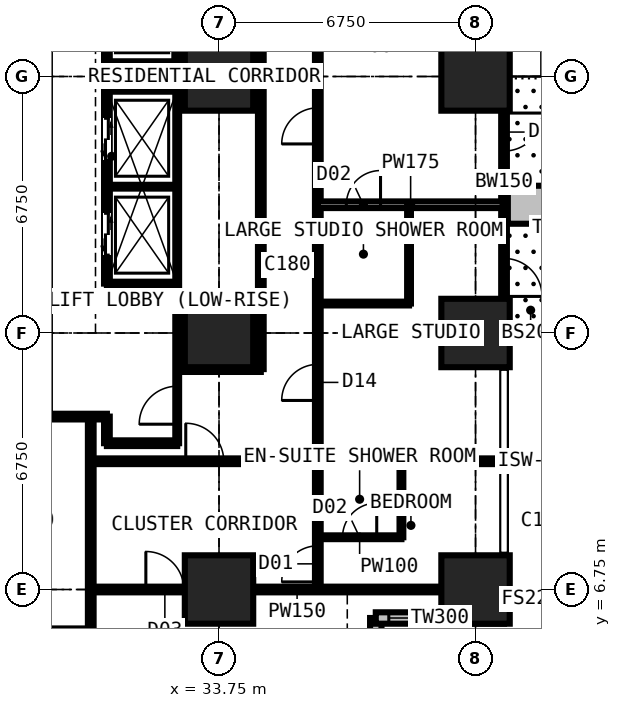
"""IFC4 building model, lengths in metres.
Left out: names, types, materials, properties, quantities, classifications, styles, units other than length and angle.
Written with IfcOpenShell. Run it as: python <this file> out.ifc"""

import sys

from ifc_helpers import new_model, si_unit, direction, frame, frame_2d, origin, origin_2d, place, context, subcontext, project, spatial, rectangle, extrude, element, fill, save


model = new_model("IFC4")
c1 = context("Model", 3, precision=1e-05, world=origin(), true_north=direction((0.0, 1.0)))
c2 = subcontext(c1, "Body", "Model", "MODEL_VIEW")
j1 = project(units=[si_unit("LENGTHUNIT", "METRE"), si_unit("PLANEANGLEUNIT", "RADIAN")], contexts=[c1])
p1 = place(None, origin())
s1 = spatial("IfcSite", under=j1, at=p1, CompositionType="ELEMENT")
p2 = place(p1, origin())
s2 = spatial("IfcBuilding", under=s1, at=p2, CompositionType="ELEMENT")
p3 = place(p2, frame((0.0, 0.0, 68.4)))
s3 = spatial("IfcBuildingStorey", under=s2, at=p3, CompositionType="ELEMENT", Elevation=68.4)
for number, where, z_axis, x_axis in (
    (1, (33.75, 6.75, 0.0), (0.0, 0.0, 1.0), (1.0, 0.0, 0.0)),
    (2, (33.75, 13.5, 0.0), (0.0, 0.0, 1.0), (1.0, 0.0, 0.0)),
    (3, (33.75, 20.25, 0.0), (0.0, 0.0, 1.0), (1.0, 0.0, 0.0)),
    (4, (40.5, 6.75, 0.0), (0.0, 0.0, 1.0), (1.0, 0.0, 0.0)),
    (5, (40.5, 13.5, 0.0), (0.0, 0.0, 1.0), (1.0, 0.0, 0.0)),
    (6, (40.5, 20.25, 0.0), (0.0, 0.0, 1.0), (1.0, 0.0, 0.0)),
):
    element("IfcColumn", number, at=place(p3, frame(where, z_axis=z_axis, x_axis=x_axis)), inside=s3, PredefinedType="COLUMN", context=c2, shape_type="SweptSolid", body=[
        extrude(rectangle(XDim=1.8, YDim=1.8, at=origin_2d()), origin(), (0.0, 0.0, 1.0), 3.6),
    ])
p4 = place(p3, frame((41.25, 20.25, 0.0), z_axis=(0.0, 0.0, 1.0), x_axis=(0.0, -1.0, 0.0)))
e7 = element("IfcWall", 7, at=p4, inside=s3, PredefinedType="SOLIDWALL", context=c2, shape_type="SweptSolid", body=[
    extrude(rectangle(XDim=6.75, YDim=0.15, at=frame_2d((3.375, 0.0))), origin(), (0.0, 0.0, 1.0), 3.375),
])
p5 = place(p4, frame((0.962, 0.0, 0.0)))
e8 = element("IfcOpeningElement", 8, at=p5, cuts=e7, PredefinedType="OPENING", context=c2, shape_type="SweptSolid", body=[
    extrude(rectangle(XDim=1.0, YDim=2.2, at=frame_2d((0.5, 1.1))), frame((0.0, 0.085, 0.0), z_axis=(0.0, -1.0, 0.0), x_axis=(1.0, 0.0, 0.0)), (0.0, 0.0, 1.0), 0.17),
])
p6 = place(p4, frame((2.025, 0.0, 0.9)))
e9 = element("IfcOpeningElement", 9, at=p6, cuts=e7, PredefinedType="OPENING", context=c2, shape_type="SweptSolid", body=[
    extrude(rectangle(XDim=1.2, YDim=1.8, at=frame_2d((0.6, 0.9))), frame((0.0, 0.085, 0.0), z_axis=(0.0, -1.0, 0.0), x_axis=(1.0, 0.0, 0.0)), (0.0, 0.0, 1.0), 0.17),
])
p7 = place(p4, frame((4.788, 0.0, 0.0)))
e10 = element("IfcOpeningElement", 10, at=p7, cuts=e7, PredefinedType="OPENING", context=c2, shape_type="SweptSolid", body=[
    extrude(rectangle(XDim=1.0, YDim=2.2, at=frame_2d((0.5, 1.1))), frame((0.0, 0.085, 0.0), z_axis=(0.0, -1.0, 0.0), x_axis=(1.0, 0.0, 0.0)), (0.0, 0.0, 1.0), 0.17),
])
p8 = place(p4, frame((3.525, 0.0, 0.9)))
e11 = element("IfcOpeningElement", 11, at=p8, cuts=e7, PredefinedType="OPENING", context=c2, shape_type="SweptSolid", body=[
    extrude(rectangle(XDim=1.2, YDim=1.8, at=frame_2d((0.6, 0.9))), frame((0.0, 0.085, 0.0), z_axis=(0.0, -1.0, 0.0), x_axis=(1.0, 0.0, 0.0)), (0.0, 0.0, 1.0), 0.17),
])
p9 = place(p3, frame((37.875, 2.625, 0.0), z_axis=(0.0, 0.0, 1.0), x_axis=(0.0, 1.0, 0.0)))
e12 = element("IfcWall", 12, at=p9, inside=s3, PredefinedType="SOLIDWALL", context=c2, shape_type="SweptSolid", body=[
    extrude(rectangle(XDim=3.375, YDim=0.3, at=frame_2d((1.688, 0.0))), origin(), (0.0, 0.0, 1.0), 3.375),
])
p10 = place(p9, frame((0.788, 0.0, 0.6)))
e13 = element("IfcOpeningElement", 13, at=p10, cuts=e12, PredefinedType="OPENING", context=c2, shape_type="SweptSolid", body=[
    extrude(rectangle(XDim=1.8, YDim=2.1, at=frame_2d((0.9, 1.05))), frame((0.0, 0.16, 0.0), z_axis=(0.0, -1.0, 0.0), x_axis=(1.0, 0.0, 0.0)), (0.0, 0.0, 1.0), 0.32),
])
p11 = place(p3, frame((37.875, 6.0, 0.0), z_axis=(0.0, 0.0, 1.0), x_axis=(1.0, 0.0, 0.0)))
e14 = element("IfcWall", 14, at=p11, inside=s3, PredefinedType="SOLIDWALL", context=c2, shape_type="SweptSolid", body=[
    extrude(rectangle(XDim=3.375, YDim=0.3, at=frame_2d((1.688, 0.0))), origin(), (0.0, 0.0, 1.0), 3.375),
])
p12 = place(p11, frame((0.343, 0.0, 0.9)))
e15 = element("IfcOpeningElement", 15, at=p12, cuts=e14, PredefinedType="OPENING", context=c2, shape_type="SweptSolid", body=[
    extrude(rectangle(XDim=1.2, YDim=1.8, at=frame_2d((0.6, 0.9))), frame((0.0, 0.16, 0.0), z_axis=(0.0, -1.0, 0.0), x_axis=(1.0, 0.0, 0.0)), (0.0, 0.0, 1.0), 0.32),
])
p13 = place(p3, frame((41.35, 16.875, 0.0), z_axis=(0.0, 0.0, 1.0), x_axis=(1.0, 0.0, 0.0)))
e16 = element("IfcWall", 16, at=p13, inside=s3, PredefinedType="USERDEFINED", context=c2, shape_type="SweptSolid", body=[
    extrude(rectangle(XDim=2.2, YDim=1.0, at=frame_2d((1.1, 0.0))), origin(), (0.0, 0.0, 1.0), 0.9),
])
p14 = place(p3, frame((10.125, 11.3, 0.0), z_axis=(0.0, 0.0, 1.0), x_axis=(1.0, 0.0, 0.0)))
e17 = element("IfcWall", 17, at=p14, inside=s3, PredefinedType="PARTITIONING", context=c2, shape_type="SweptSolid", body=[
    extrude(rectangle(XDim=20.675, YDim=0.15, at=frame_2d((10.337, 0.0))), origin(), (0.0, 0.0, 1.0), 3.375),
])
p15 = place(p14, frame((8.375, 0.0, 0.0)))
e18 = element("IfcOpeningElement", 18, at=p15, cuts=e17, PredefinedType="OPENING", context=c2, shape_type="SweptSolid", body=[
    extrude(rectangle(XDim=1.0, YDim=2.2, at=frame_2d((0.5, 1.1))), frame((0.0, 0.085, 0.0), z_axis=(0.0, -1.0, 0.0), x_axis=(1.0, 0.0, 0.0)), (0.0, 0.0, 1.0), 0.17),
])
p16 = place(p14, frame((10.975, 0.0, 0.0)))
e19 = element("IfcOpeningElement", 19, at=p16, cuts=e17, PredefinedType="OPENING", context=c2, shape_type="SweptSolid", body=[
    extrude(rectangle(XDim=1.0, YDim=2.2, at=frame_2d((0.5, 1.1))), frame((0.0, 0.085, 0.0), z_axis=(0.0, -1.0, 0.0), x_axis=(1.0, 0.0, 0.0)), (0.0, 0.0, 1.0), 0.17),
])
p17 = place(p14, frame((3.925, 0.0, 0.0)))
e20 = element("IfcOpeningElement", 20, at=p17, cuts=e17, PredefinedType="OPENING", context=c2, shape_type="SweptSolid", body=[
    extrude(rectangle(XDim=0.95, YDim=2.2, at=frame_2d((0.475, 1.1))), frame((0.0, 0.085, 0.0), z_axis=(0.0, -1.0, 0.0), x_axis=(1.0, 0.0, 0.0)), (0.0, 0.0, 1.0), 0.17),
])
p18 = place(p3, frame((30.375, -0.734, 0.0), z_axis=(0.0, 0.0, 1.0), x_axis=(0.0, 1.0, 0.0)))
e21 = element("IfcWall", 21, at=p18, inside=s3, PredefinedType="PARTITIONING", context=c2, shape_type="SweptSolid", body=[
    extrude(rectangle(XDim=12.034, YDim=0.15, at=frame_2d((6.017, 0.0))), origin(), (0.0, 0.0, 1.0), 3.375),
])
p19 = place(p3, frame((30.375, 6.75, 0.0), z_axis=(0.0, 0.0, 1.0), x_axis=(1.0, 0.0, 0.0)))
e22 = element("IfcWall", 22, at=p19, inside=s3, PredefinedType="PARTITIONING", context=c2, shape_type="SweptSolid", body=[
    extrude(rectangle(XDim=10.859, YDim=0.15, at=frame_2d((5.429, 0.0))), origin(), (0.0, 0.0, 1.0), 2.877),
])
p20 = place(p19, frame((1.45, 0.0, 0.0)))
e23 = element("IfcOpeningElement", 23, at=p20, cuts=e22, PredefinedType="OPENING", context=c2, shape_type="SweptSolid", body=[
    extrude(rectangle(XDim=1.0, YDim=2.2, at=frame_2d((0.5, 1.1))), frame((0.0, 0.085, 0.0), z_axis=(0.0, -1.0, 0.0), x_axis=(1.0, 0.0, 0.0)), (0.0, 0.0, 1.0), 0.17),
])
p21 = place(p3, frame((30.375, 10.125, 0.0), z_axis=(0.0, 0.0, 1.0), x_axis=(1.0, 0.0, 0.0)))
e24 = element("IfcWall", 24, at=p21, inside=s3, PredefinedType="PARTITIONING", context=c2, shape_type="SweptSolid", body=[
    extrude(rectangle(XDim=10.859, YDim=0.15, at=frame_2d((5.429, 0.0))), origin(), (0.0, 0.0, 1.0), 3.375),
])
p22 = place(p21, frame((2.5, 0.0, 0.0)))
e25 = element("IfcOpeningElement", 25, at=p22, cuts=e24, PredefinedType="OPENING", context=c2, shape_type="SweptSolid", body=[
    extrude(rectangle(XDim=1.0, YDim=2.2, at=frame_2d((0.5, 1.1))), frame((0.0, 0.085, 0.0), z_axis=(0.0, -1.0, 0.0), x_axis=(1.0, 0.0, 0.0)), (0.0, 0.0, 1.0), 0.17),
])
p23 = place(p3, frame((30.8, 10.6, 0.0), z_axis=(0.0, 0.0, 1.0), x_axis=(0.0, 1.0, 0.0)))
e26 = element("IfcWall", 26, at=p23, inside=s3, PredefinedType="PARTITIONING", context=c2, shape_type="SweptSolid", body=[
    extrude(rectangle(XDim=0.7, YDim=0.15, at=frame_2d((0.35, 0.0))), origin(), (0.0, 0.0, 1.0), 3.375),
])
p24 = place(p3, frame((30.8, 10.6, 0.0), z_axis=(0.0, 0.0, 1.0), x_axis=(1.0, 0.0, 0.0)))
e27 = element("IfcWall", 27, at=p24, inside=s3, PredefinedType="PARTITIONING", context=c2, shape_type="SweptSolid", body=[
    extrude(rectangle(XDim=1.85, YDim=0.15, at=frame_2d((0.925, 0.0))), origin(), (0.0, 0.0, 1.0), 3.375),
])
p25 = place(p3, frame((30.8, 14.8, 0.0), z_axis=(0.0, 0.0, 1.0), x_axis=(0.0, 1.0, 0.0)))
e28 = element("IfcWall", 28, at=p25, inside=s3, PredefinedType="PARTITIONING", context=c2, shape_type="SweptSolid", body=[
    extrude(rectangle(XDim=10.9, YDim=0.15, at=frame_2d((5.45, 0.0))), origin(), (0.0, 0.0, 1.0), 3.375),
])
p26 = place(p25, frame((0.75, 0.0, 0.0)))
e29 = element("IfcOpeningElement", 29, at=p26, cuts=e28, PredefinedType="OPENING", context=c2, shape_type="SweptSolid", body=[
    extrude(rectangle(XDim=1.1, YDim=2.2, at=frame_2d((0.55, 1.1))), frame((0.0, 0.085, 0.0), z_axis=(0.0, -1.0, 0.0), x_axis=(1.0, 0.0, 0.0)), (0.0, 0.0, 1.0), 0.17),
])
p27 = place(p25, frame((3.25, 0.0, 0.0)))
e30 = element("IfcOpeningElement", 30, at=p27, cuts=e28, PredefinedType="OPENING", context=c2, shape_type="SweptSolid", body=[
    extrude(rectangle(XDim=1.1, YDim=2.2, at=frame_2d((0.55, 1.1))), frame((0.0, 0.085, 0.0), z_axis=(0.0, -1.0, 0.0), x_axis=(1.0, 0.0, 0.0)), (0.0, 0.0, 1.0), 0.17),
])
p28 = place(p25, frame((6.5, 0.0, 0.0)))
e31 = element("IfcOpeningElement", 31, at=p28, cuts=e28, PredefinedType="OPENING", context=c2, shape_type="SweptSolid", body=[
    extrude(rectangle(XDim=1.1, YDim=2.2, at=frame_2d((0.55, 1.1))), frame((0.0, 0.085, 0.0), z_axis=(0.0, -1.0, 0.0), x_axis=(1.0, 0.0, 0.0)), (0.0, 0.0, 1.0), 0.17),
])
p29 = place(p25, frame((9.05, 0.0, 0.0)))
e32 = element("IfcOpeningElement", 32, at=p29, cuts=e28, PredefinedType="OPENING", context=c2, shape_type="SweptSolid", body=[
    extrude(rectangle(XDim=1.1, YDim=2.2, at=frame_2d((0.55, 1.1))), frame((0.0, 0.085, 0.0), z_axis=(0.0, -1.0, 0.0), x_axis=(1.0, 0.0, 0.0)), (0.0, 0.0, 1.0), 0.17),
])
for number, where, z_axis, x_axis in (
    (33, (30.8, 14.8, 0.0), (0.0, 0.0, 1.0), (1.0, 0.0, 0.0)),
    (34, (30.8, 17.35, 0.0), (0.0, 0.0, 1.0), (1.0, 0.0, 0.0)),
    (35, (30.8, 19.9, 0.0), (0.0, 0.0, 1.0), (1.0, 0.0, 0.0)),
    (36, (30.8, 20.6, 0.0), (0.0, 0.0, 1.0), (1.0, 0.0, 0.0)),
):
    element("IfcWall", number, at=place(p3, frame(where, z_axis=z_axis, x_axis=x_axis)), inside=s3, PredefinedType="SHEAR", context=c2, shape_type="SweptSolid", body=[
        extrude(rectangle(XDim=1.85, YDim=0.1, at=frame_2d((0.925, 0.0))), origin(), (0.0, 0.0, 1.0), 3.375),
    ])
p30 = place(p3, frame((32.65, 10.6, 0.0), z_axis=(0.0, 0.0, 1.0), x_axis=(0.0, 1.0, 0.0)))
e37 = element("IfcWall", 37, at=p30, inside=s3, PredefinedType="SHEAR", context=c2, shape_type="SweptSolid", body=[
    extrude(rectangle(XDim=9.3, YDim=0.1, at=frame_2d((4.65, 0.0))), origin(), (0.0, 0.0, 1.0), 3.375),
])
p31 = place(p30, frame((0.5, 0.0, 0.0)))
e38 = element("IfcOpeningElement", 38, at=p31, cuts=e37, PredefinedType="OPENING", context=c2, shape_type="SweptSolid", body=[
    extrude(rectangle(XDim=1.0, YDim=2.2, at=frame_2d((0.5, 1.1))), frame((0.0, 0.06, 0.0), z_axis=(0.0, -1.0, 0.0), x_axis=(1.0, 0.0, 0.0)), (0.0, 0.0, 1.0), 0.12),
])
p32 = place(p3, frame((32.65, 12.55, 0.0), z_axis=(0.0, 0.0, 1.0), x_axis=(1.0, 0.0, 0.0)))
e39 = element("IfcWall", 39, at=p32, inside=s3, PredefinedType="PARTITIONING", context=c2, shape_type="SweptSolid", body=[
    extrude(rectangle(XDim=2.2, YDim=0.15, at=frame_2d((1.1, 0.0))), origin(), (0.0, 0.0, 1.0), 3.375),
])
p33 = place(p3, frame((32.65, 20.6, 0.0), z_axis=(0.0, 0.0, 1.0), x_axis=(0.0, 1.0, 0.0)))
e40 = element("IfcWall", 40, at=p33, inside=s3, PredefinedType="PARTITIONING", context=c2, shape_type="SweptSolid", body=[
    extrude(rectangle(XDim=5.1, YDim=0.15, at=frame_2d((2.55, 0.0))), origin(), (0.0, 0.0, 1.0), 3.375),
])
p34 = place(p3, frame((34.85, 12.55, 0.0), z_axis=(0.0, 0.0, 1.0), x_axis=(0.0, 1.0, 0.0)))
e41 = element("IfcWall", 41, at=p34, inside=s3, PredefinedType="PARTITIONING", context=c2, shape_type="SweptSolid", body=[
    extrude(rectangle(XDim=17.825, YDim=0.15, at=frame_2d((8.913, 0.0))), origin(), (0.0, 0.0, 1.0), 3.375),
])
p35 = place(p34, frame((8.6, 0.0, 0.0)))
e42 = element("IfcOpeningElement", 42, at=p35, cuts=e41, PredefinedType="OPENING", context=c2, shape_type="SweptSolid", body=[
    extrude(rectangle(XDim=0.95, YDim=2.2, at=frame_2d((0.475, 1.1))), frame((0.0, 0.085, 0.0), z_axis=(0.0, -1.0, 0.0), x_axis=(1.0, 0.0, 0.0)), (0.0, 0.0, 1.0), 0.17),
])
p36 = place(p3, frame((36.35, 6.75, 0.0), z_axis=(0.0, 0.0, 1.0), x_axis=(0.0, 1.0, 0.0)))
e43 = element("IfcWall", 43, at=p36, inside=s3, PredefinedType="PARTITIONING", context=c2, shape_type="SweptSolid", body=[
    extrude(rectangle(XDim=23.625, YDim=0.15, at=frame_2d((11.812, 0.0))), origin(), (0.0, 0.0, 1.0), 3.375),
])
p37 = place(p36, frame((0.2, 0.0, 0.0)))
e44 = element("IfcOpeningElement", 44, at=p37, cuts=e43, PredefinedType="OPENING", context=c2, shape_type="SweptSolid", body=[
    extrude(rectangle(XDim=0.95, YDim=2.2, at=frame_2d((0.475, 1.1))), frame((0.0, 0.085, 0.0), z_axis=(0.0, -1.0, 0.0), x_axis=(1.0, 0.0, 0.0)), (0.0, 0.0, 1.0), 0.17),
])
p38 = place(p36, frame((18.475, 0.0, 0.0)))
e45 = element("IfcOpeningElement", 45, at=p38, cuts=e43, PredefinedType="OPENING", context=c2, shape_type="SweptSolid", body=[
    extrude(rectangle(XDim=0.95, YDim=2.2, at=frame_2d((0.475, 1.1))), frame((0.0, 0.085, 0.0), z_axis=(0.0, -1.0, 0.0), x_axis=(1.0, 0.0, 0.0)), (0.0, 0.0, 1.0), 0.17),
])
p39 = place(p36, frame((11.725, 0.0, 0.0)))
e46 = element("IfcOpeningElement", 46, at=p39, cuts=e43, PredefinedType="OPENING", context=c2, shape_type="SweptSolid", body=[
    extrude(rectangle(XDim=0.95, YDim=2.2, at=frame_2d((0.475, 1.1))), frame((0.0, 0.085, 0.0), z_axis=(0.0, -1.0, 0.0), x_axis=(1.0, 0.0, 0.0)), (0.0, 0.0, 1.0), 0.17),
])
p40 = place(p36, frame((4.975, 0.0, 0.0)))
e47 = element("IfcOpeningElement", 47, at=p40, cuts=e43, PredefinedType="OPENING", context=c2, shape_type="SweptSolid", body=[
    extrude(rectangle(XDim=0.95, YDim=2.2, at=frame_2d((0.475, 1.1))), frame((0.0, 0.085, 0.0), z_axis=(0.0, -1.0, 0.0), x_axis=(1.0, 0.0, 0.0)), (0.0, 0.0, 1.0), 0.17),
])
p41 = place(p3, frame((36.35, 8.125, 0.0), z_axis=(0.0, 0.0, 1.0), x_axis=(1.0, 0.0, 0.0)))
e48 = element("IfcWall", 48, at=p41, inside=s3, PredefinedType="PARTITIONING", context=c2, shape_type="SweptSolid", body=[
    extrude(rectangle(XDim=2.2, YDim=0.1, at=frame_2d((1.1, 0.0))), origin(), (0.0, 0.0, 1.0), 3.375),
])
p42 = place(p41, frame((0.65, 0.0, 0.0)))
e49 = element("IfcOpeningElement", 49, at=p42, cuts=e48, PredefinedType="OPENING", context=c2, shape_type="SweptSolid", body=[
    extrude(rectangle(XDim=0.9, YDim=2.2, at=frame_2d((0.45, 1.1))), frame((0.0, 0.06, 0.0), z_axis=(0.0, -1.0, 0.0), x_axis=(1.0, 0.0, 0.0)), (0.0, 0.0, 1.0), 0.12),
])
p43 = place(p3, frame((36.35, 14.275, 0.0), z_axis=(0.0, 0.0, 1.0), x_axis=(1.0, 0.0, 0.0)))
e50 = element("IfcWall", 50, at=p43, inside=s3, PredefinedType="PARTITIONING", context=c2, shape_type="SweptSolid", body=[
    extrude(rectangle(XDim=2.4, YDim=0.1, at=frame_2d((1.2, 0.0))), origin(), (0.0, 0.0, 1.0), 3.375),
])
p44 = place(p3, frame((36.35, 16.875, 0.0), z_axis=(0.0, 0.0, 1.0), x_axis=(1.0, 0.0, 0.0)))
e51 = element("IfcWall", 51, at=p44, inside=s3, PredefinedType="PARTITIONING", context=c2, shape_type="SweptSolid", body=[
    extrude(rectangle(XDim=4.884, YDim=0.175, at=frame_2d((2.442, 0.0))), origin(), (0.0, 0.0, 1.0), 3.375),
])
p45 = place(p44, frame((0.75, 0.0, 0.0)))
e52 = element("IfcOpeningElement", 52, at=p45, cuts=e51, PredefinedType="OPENING", context=c2, shape_type="SweptSolid", body=[
    extrude(rectangle(XDim=0.9, YDim=2.2, at=frame_2d((0.45, 1.1))), frame((0.0, 0.097, 0.0), z_axis=(0.0, -1.0, 0.0), x_axis=(1.0, 0.0, 0.0)), (0.0, 0.0, 1.0), 0.195),
])
p46 = place(p3, frame((38.55, 8.125, 0.0), z_axis=(0.0, 0.0, 1.0), x_axis=(0.0, 1.0, 0.0)))
e53 = element("IfcWall", 53, at=p46, inside=s3, PredefinedType="PARTITIONING", context=c2, shape_type="SweptSolid", body=[
    extrude(rectangle(XDim=2.0, YDim=0.1, at=frame_2d((1.0, 0.0))), origin(), (0.0, 0.0, 1.0), 3.375),
])
p47 = place(p3, frame((38.75, 14.275, 0.0), z_axis=(0.0, 0.0, 1.0), x_axis=(0.0, 1.0, 0.0)))
e54 = element("IfcWall", 54, at=p47, inside=s3, PredefinedType="PARTITIONING", context=c2, shape_type="SweptSolid", body=[
    extrude(rectangle(XDim=2.6, YDim=0.1, at=frame_2d((1.3, 0.0))), origin(), (0.0, 0.0, 1.0), 3.375),
])
p48 = place(p5, origin())
e55 = element("IfcDoor", 55, at=p48, inside=s3, OperationType="SINGLE_SWING_LEFT", PredefinedType="DOOR", context=c2, shape_type="SweptSolid", body=[
    extrude(rectangle(XDim=1.0, YDim=2.2, at=frame_2d((0.5, 1.1))), frame((0.0, 0.025, 0.0), z_axis=(0.0, -1.0, 0.0), x_axis=(1.0, 0.0, 0.0)), (0.0, 0.0, 1.0), 0.05),
])
fill(e8, e55)
p49 = place(p6, origin())
e56 = element("IfcWindow", 56, at=p49, inside=s3, PartitioningType="SINGLE_PANEL", PredefinedType="WINDOW", context=c2, shape_type="SweptSolid", body=[
    extrude(rectangle(XDim=1.2, YDim=1.8, at=frame_2d((0.6, 0.9))), frame((0.0, 0.03, 0.0), z_axis=(0.0, -1.0, 0.0), x_axis=(1.0, 0.0, 0.0)), (0.0, 0.0, 1.0), 0.06),
])
fill(e9, e56)
p50 = place(p7, origin())
e57 = element("IfcDoor", 57, at=p50, inside=s3, OperationType="SINGLE_SWING_RIGHT", PredefinedType="DOOR", context=c2, shape_type="SweptSolid", body=[
    extrude(rectangle(XDim=1.0, YDim=2.2, at=frame_2d((0.5, 1.1))), frame((0.0, 0.025, 0.0), z_axis=(0.0, -1.0, 0.0), x_axis=(1.0, 0.0, 0.0)), (0.0, 0.0, 1.0), 0.05),
])
fill(e10, e57)
p51 = place(p8, origin())
e58 = element("IfcWindow", 58, at=p51, inside=s3, PartitioningType="SINGLE_PANEL", PredefinedType="WINDOW", context=c2, shape_type="SweptSolid", body=[
    extrude(rectangle(XDim=1.2, YDim=1.8, at=frame_2d((0.6, 0.9))), frame((0.0, 0.03, 0.0), z_axis=(0.0, -1.0, 0.0), x_axis=(1.0, 0.0, 0.0)), (0.0, 0.0, 1.0), 0.06),
])
fill(e11, e58)
p52 = place(p12, origin())
e59 = element("IfcWindow", 59, at=p52, inside=s3, PartitioningType="SINGLE_PANEL", PredefinedType="WINDOW", context=c2, shape_type="SweptSolid", body=[
    extrude(rectangle(XDim=1.2, YDim=1.8, at=frame_2d((0.6, 0.9))), frame((0.0, 0.03, 0.0), z_axis=(0.0, -1.0, 0.0), x_axis=(1.0, 0.0, 0.0)), (0.0, 0.0, 1.0), 0.06),
])
fill(e15, e59)
p53 = place(p20, origin())
e60 = element("IfcDoor", 60, at=p53, inside=s3, OperationType="SINGLE_SWING_LEFT", PredefinedType="DOOR", context=c2, shape_type="SweptSolid", body=[
    extrude(rectangle(XDim=1.0, YDim=2.2, at=frame_2d((0.5, 1.1))), frame((0.0, 0.025, 0.0), z_axis=(0.0, -1.0, 0.0), x_axis=(1.0, 0.0, 0.0)), (0.0, 0.0, 1.0), 0.05),
])
fill(e23, e60)
p54 = place(p37, origin())
e61 = element("IfcDoor", 61, at=p54, inside=s3, OperationType="SINGLE_SWING_LEFT", PredefinedType="DOOR", context=c2, shape_type="SweptSolid", body=[
    extrude(rectangle(XDim=0.95, YDim=2.2, at=frame_2d((0.475, 1.1))), frame((0.0, 0.025, 0.0), z_axis=(0.0, -1.0, 0.0), x_axis=(1.0, 0.0, 0.0)), (0.0, 0.0, 1.0), 0.05),
])
fill(e44, e61)
p55 = place(p42, origin())
e62 = element("IfcDoor", 62, at=p55, inside=s3, OperationType="SINGLE_SWING_RIGHT", PredefinedType="DOOR", context=c2, shape_type="SweptSolid", body=[
    extrude(rectangle(XDim=0.9, YDim=2.2, at=frame_2d((0.45, 1.1))), frame((0.0, 0.025, 0.0), z_axis=(0.0, -1.0, 0.0), x_axis=(1.0, 0.0, 0.0)), (0.0, 0.0, 1.0), 0.05),
])
fill(e49, e62)
p56 = place(p22, origin())
e63 = element("IfcDoor", 63, at=p56, inside=s3, OperationType="SINGLE_SWING_LEFT", PredefinedType="DOOR", context=c2, shape_type="SweptSolid", body=[
    extrude(rectangle(XDim=1.0, YDim=2.2, at=frame_2d((0.5, 1.1))), frame((0.0, 0.025, 0.0), z_axis=(0.0, -1.0, 0.0), x_axis=(1.0, 0.0, 0.0)), (0.0, 0.0, 1.0), 0.05),
])
fill(e25, e63)
p57 = place(p39, origin())
e64 = element("IfcDoor", 64, at=p57, inside=s3, OperationType="SINGLE_SWING_LEFT", PredefinedType="DOOR", context=c2, shape_type="SweptSolid", body=[
    extrude(rectangle(XDim=0.95, YDim=2.2, at=frame_2d((0.475, 1.1))), frame((0.0, 0.025, 0.0), z_axis=(0.0, -1.0, 0.0), x_axis=(1.0, 0.0, 0.0)), (0.0, 0.0, 1.0), 0.05),
])
fill(e46, e64)
p58 = place(p40, origin())
e65 = element("IfcDoor", 65, at=p58, inside=s3, OperationType="SINGLE_SWING_LEFT", PredefinedType="DOOR", context=c2, shape_type="SweptSolid", body=[
    extrude(rectangle(XDim=0.95, YDim=2.2, at=frame_2d((0.475, 1.1))), frame((0.0, 0.025, 0.0), z_axis=(0.0, -1.0, 0.0), x_axis=(1.0, 0.0, 0.0)), (0.0, 0.0, 1.0), 0.05),
])
fill(e47, e65)
p59 = place(p45, origin())
e66 = element("IfcDoor", 66, at=p59, inside=s3, OperationType="SINGLE_SWING_RIGHT", PredefinedType="DOOR", context=c2, shape_type="SweptSolid", body=[
    extrude(rectangle(XDim=0.9, YDim=2.2, at=frame_2d((0.45, 1.1))), frame((0.0, 0.025, 0.0), z_axis=(0.0, -1.0, 0.0), x_axis=(1.0, 0.0, 0.0)), (0.0, 0.0, 1.0), 0.05),
])
fill(e52, e66)
p60 = place(p31, origin())
e67 = element("IfcDoor", 67, at=p60, inside=s3, OperationType="SINGLE_SWING_LEFT", PredefinedType="DOOR", context=c2, shape_type="SweptSolid", body=[
    extrude(rectangle(XDim=1.0, YDim=2.2, at=frame_2d((0.5, 1.1))), frame((0.0, 0.025, 0.0), z_axis=(0.0, -1.0, 0.0), x_axis=(1.0, 0.0, 0.0)), (0.0, 0.0, 1.0), 0.05),
])
fill(e38, e67)
p61 = place(p26, origin())
e68 = element("IfcDoor", 68, at=p61, inside=s3, OperationType="DOUBLE_DOOR_SLIDING", PredefinedType="DOOR", context=c2, shape_type="SweptSolid", body=[
    extrude(rectangle(XDim=1.1, YDim=2.2, at=frame_2d((0.55, 1.1))), frame((0.0, 0.025, 0.0), z_axis=(0.0, -1.0, 0.0), x_axis=(1.0, 0.0, 0.0)), (0.0, 0.0, 1.0), 0.05),
])
fill(e29, e68)
p62 = place(p27, origin())
e69 = element("IfcDoor", 69, at=p62, inside=s3, OperationType="DOUBLE_DOOR_SLIDING", PredefinedType="DOOR", context=c2, shape_type="SweptSolid", body=[
    extrude(rectangle(XDim=1.1, YDim=2.2, at=frame_2d((0.55, 1.1))), frame((0.0, 0.025, 0.0), z_axis=(0.0, -1.0, 0.0), x_axis=(1.0, 0.0, 0.0)), (0.0, 0.0, 1.0), 0.05),
])
fill(e30, e69)
save(model, sys.argv[1])
